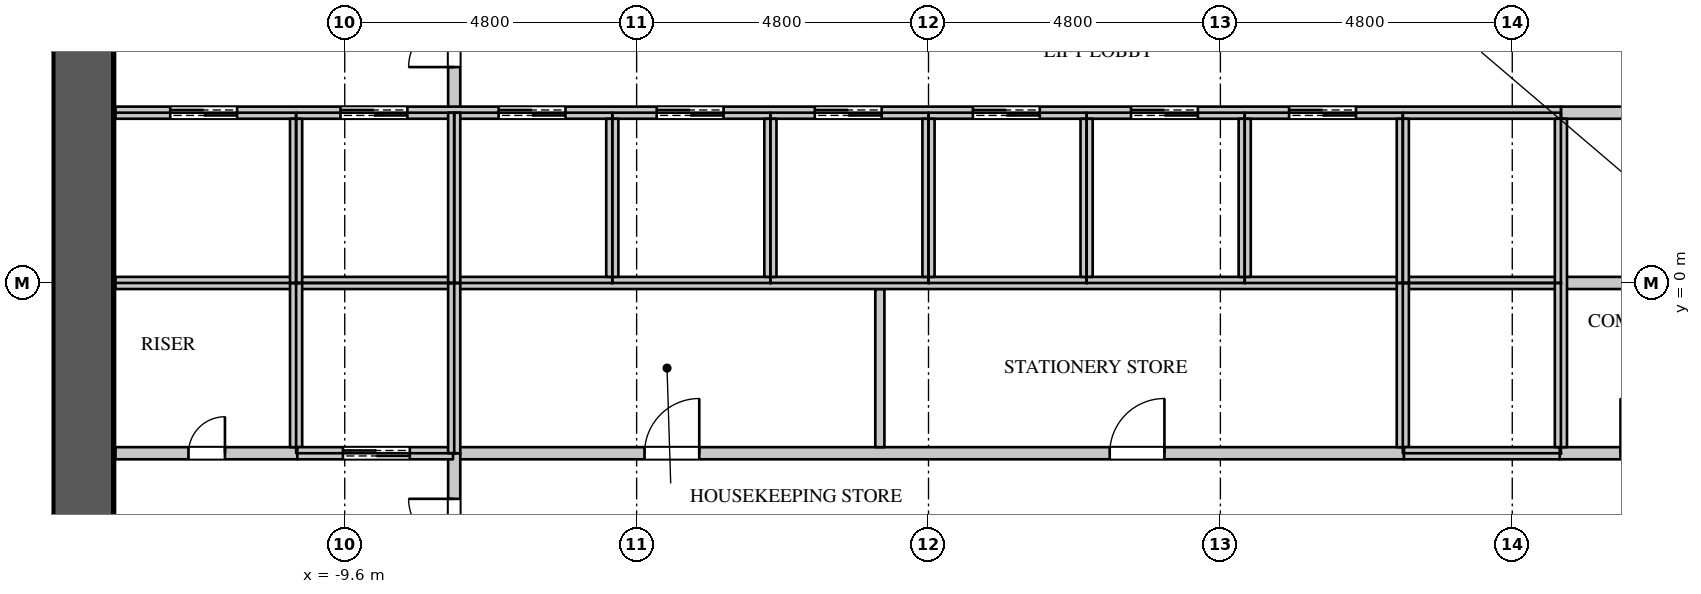
"""IFC4 building model, lengths in metres.
Left out: names, types, materials, properties, quantities, classifications, styles, units other than length and angle.
Written with IfcOpenShell. Run it as: python <this file> out.ifc"""

import sys

from ifc_helpers import new_model, si_unit, direction, frame, frame_2d, origin, place, context, subcontext, project, spatial, rectangle, extrude, element, fill, save


model = new_model("IFC4")
c1 = context("Model", 3, precision=1e-05, world=origin(), true_north=direction((0.0, 1.0)))
c2 = subcontext(c1, "Body", "Model", "MODEL_VIEW")
j1 = project(units=[si_unit("LENGTHUNIT", "METRE"), si_unit("PLANEANGLEUNIT", "RADIAN")], contexts=[c1])
p1 = place(None, origin())
s1 = spatial("IfcSite", under=j1, at=p1, CompositionType="ELEMENT")
p2 = place(p1, origin())
s2 = spatial("IfcBuilding", under=s1, at=p2, CompositionType="ELEMENT")
p3 = place(p2, frame((0.0, 0.0, 38.1)))
s3 = spatial("IfcBuildingStorey", under=s2, at=p3, CompositionType="ELEMENT", Elevation=38.1)
p4 = place(p3, frame((-13.9, -11.0, 0.0), z_axis=(0.0, 0.0, 1.0), x_axis=(0.0, 1.0, 0.0)))
e1 = element("IfcWall", 1, at=p4, inside=s3, PredefinedType="SHEAR", context=c2, shape_type="SweptSolid", body=[
    extrude(rectangle(XDim=22.0, YDim=1.0, at=frame_2d((11.0, 0.0))), origin(), (0.0, 0.0, 1.0), 4.2),
])
p5 = place(p4, frame((20.05, 0.0, 0.0)))
e2 = element("IfcOpeningElement", 2, at=p5, cuts=e1, PredefinedType="OPENING", context=c2, shape_type="SweptSolid", body=[
    extrude(rectangle(XDim=1.1, YDim=2.2, at=frame_2d((0.55, 1.1))), frame((0.0, 0.51, 0.0), z_axis=(0.0, -1.0, 0.0), x_axis=(1.0, 0.0, 0.0)), (0.0, 0.0, 1.0), 1.02),
])
p6 = place(p4, frame((0.85, 0.0, 0.0)))
e3 = element("IfcOpeningElement", 3, at=p6, cuts=e1, PredefinedType="OPENING", context=c2, shape_type="SweptSolid", body=[
    extrude(rectangle(XDim=1.1, YDim=2.2, at=frame_2d((0.55, 1.1))), frame((0.0, 0.51, 0.0), z_axis=(0.0, -1.0, 0.0), x_axis=(1.0, 0.0, 0.0)), (0.0, 0.0, 1.0), 1.02),
])
p7 = place(p4, frame((15.75, 0.0, 0.0)))
e4 = element("IfcOpeningElement", 4, at=p7, cuts=e1, PredefinedType="OPENING", context=c2, shape_type="SweptSolid", body=[
    extrude(rectangle(XDim=1.5, YDim=2.4, at=frame_2d((0.75, 1.2))), frame((0.0, 0.51, 0.0), z_axis=(0.0, -1.0, 0.0), x_axis=(1.0, 0.0, 0.0)), (0.0, 0.0, 1.0), 1.02),
])
p8 = place(p4, frame((4.75, 0.0, 0.0)))
e5 = element("IfcOpeningElement", 5, at=p8, cuts=e1, PredefinedType="OPENING", context=c2, shape_type="SweptSolid", body=[
    extrude(rectangle(XDim=1.5, YDim=2.4, at=frame_2d((0.75, 1.2))), frame((0.0, 0.51, 0.0), z_axis=(0.0, -1.0, 0.0), x_axis=(1.0, 0.0, 0.0)), (0.0, 0.0, 1.0), 1.02),
])
p9 = place(p3, frame((-7.82, -2.8, 0.0), z_axis=(0.0, 0.0, 1.0), x_axis=(1.0, 0.0, 0.0)))
e6 = element("IfcWall", 6, at=p9, inside=s3, PredefinedType="PARTITIONING", context=c2, shape_type="SweptSolid", body=[
    extrude(rectangle(XDim=15.64, YDim=0.2, at=frame_2d((7.82, 0.0))), origin(), (0.0, 0.0, 1.0), 3.95),
])
p10 = place(p9, frame((3.15, 0.0, 0.0)))
e7 = element("IfcOpeningElement", 7, at=p10, cuts=e6, PredefinedType="OPENING", context=c2, shape_type="SweptSolid", body=[
    extrude(rectangle(XDim=0.9, YDim=2.2, at=frame_2d((0.45, 1.1))), frame((0.0, 0.11, 0.0), z_axis=(0.0, -1.0, 0.0), x_axis=(1.0, 0.0, 0.0)), (0.0, 0.0, 1.0), 0.22),
])
p11 = place(p9, frame((10.8, 0.0, 0.0)))
e8 = element("IfcOpeningElement", 8, at=p11, cuts=e6, PredefinedType="OPENING", context=c2, shape_type="SweptSolid", body=[
    extrude(rectangle(XDim=0.9, YDim=2.2, at=frame_2d((0.45, 1.1))), frame((0.0, 0.11, 0.0), z_axis=(0.0, -1.0, 0.0), x_axis=(1.0, 0.0, 0.0)), (0.0, 0.0, 1.0), 0.22),
])
p12 = place(p3, frame((-7.8, -5.8, 0.0), z_axis=(0.0, 0.0, 1.0), x_axis=(0.0, 1.0, 0.0)))
e9 = element("IfcWall", 9, at=p12, inside=s3, PredefinedType="PARTITIONING", context=c2, shape_type="SweptSolid", body=[
    extrude(rectangle(XDim=3.0, YDim=0.2, at=frame_2d((1.5, 0.0))), origin(), (0.0, 0.0, 1.0), 3.95),
])
p13 = place(p12, frame((0.75, 0.0, 0.0)))
e10 = element("IfcOpeningElement", 10, at=p13, cuts=e9, PredefinedType="OPENING", context=c2, shape_type="SweptSolid", body=[
    extrude(rectangle(XDim=1.5, YDim=2.4, at=frame_2d((0.75, 1.2))), frame((0.0, 0.11, 0.0), z_axis=(0.0, -1.0, 0.0), x_axis=(1.0, 0.0, 0.0)), (0.0, 0.0, 1.0), 0.22),
])
p14 = place(p3, frame((-7.8, 2.8, 0.0), z_axis=(0.0, 0.0, 1.0), x_axis=(0.0, 1.0, 0.0)))
e11 = element("IfcWall", 11, at=p14, inside=s3, PredefinedType="PARTITIONING", context=c2, shape_type="SweptSolid", body=[
    extrude(rectangle(XDim=5.275, YDim=0.2, at=frame_2d((2.637, 0.0))), origin(), (0.0, 0.0, 1.0), 3.95),
])
p15 = place(p14, frame((0.75, 0.0, 0.0)))
e12 = element("IfcOpeningElement", 12, at=p15, cuts=e11, PredefinedType="OPENING", context=c2, shape_type="SweptSolid", body=[
    extrude(rectangle(XDim=1.5, YDim=2.4, at=frame_2d((0.75, 1.2))), frame((0.0, 0.11, 0.0), z_axis=(0.0, -1.0, 0.0), x_axis=(1.0, 0.0, 0.0)), (0.0, 0.0, 1.0), 0.22),
])
p16 = place(p3, frame((-0.8, -2.7, 0.0), z_axis=(0.0, 0.0, 1.0), x_axis=(0.0, 1.0, 0.0)))
e13 = element("IfcWall", 13, at=p16, inside=s3, PredefinedType="PARTITIONING", context=c2, shape_type="SweptSolid", body=[
    extrude(rectangle(XDim=2.6, YDim=0.15, at=frame_2d((1.3, 0.0))), origin(), (0.0, 0.0, 1.0), 3.95),
])
p17 = place(p3, frame((-13.37, -2.8, 0.0), z_axis=(0.0, 0.0, 1.0), x_axis=(1.0, 0.0, 0.0)))
e14 = element("IfcWall", 14, at=p17, inside=s3, PredefinedType="PARTITIONING", context=c2, shape_type="SweptSolid", body=[
    extrude(rectangle(XDim=2.99, YDim=0.2, at=frame_2d((1.495, 0.0))), origin(), (0.0, 0.0, 1.0), 3.95),
])
p18 = place(p17, frame((1.2, 0.0, 0.0)))
e15 = element("IfcOpeningElement", 15, at=p18, cuts=e14, PredefinedType="OPENING", context=c2, shape_type="SweptSolid", body=[
    extrude(rectangle(XDim=0.6, YDim=2.0, at=frame_2d((0.3, 1.0))), frame((0.0, 0.11, 0.0), z_axis=(0.0, -1.0, 0.0), x_axis=(1.0, 0.0, 0.0)), (0.0, 0.0, 1.0), 0.22),
])
p19 = place(p3, frame((10.38, -2.8, 0.0), z_axis=(0.0, 0.0, 1.0), x_axis=(1.0, 0.0, 0.0)))
e16 = element("IfcWall", 16, at=p19, inside=s3, PredefinedType="PARTITIONING", context=c2, shape_type="SweptSolid", body=[
    extrude(rectangle(XDim=2.99, YDim=0.2, at=frame_2d((1.495, 0.0))), origin(), (0.0, 0.0, 1.0), 3.95),
])
p20 = place(p19, frame((1.0, 0.0, 0.0)))
e17 = element("IfcOpeningElement", 17, at=p20, cuts=e16, PredefinedType="OPENING", context=c2, shape_type="SweptSolid", body=[
    extrude(rectangle(XDim=0.9, YDim=2.2, at=frame_2d((0.45, 1.1))), frame((0.0, 0.11, 0.0), z_axis=(0.0, -1.0, 0.0), x_axis=(1.0, 0.0, 0.0)), (0.0, 0.0, 1.0), 0.22),
])
p21 = place(p3, frame((10.4, 2.8, 0.0), z_axis=(0.0, 0.0, 1.0), x_axis=(1.0, 0.0, 0.0)))
e18 = element("IfcWall", 18, at=p21, inside=s3, PredefinedType="PARTITIONING", context=c2, shape_type="SweptSolid", body=[
    extrude(rectangle(XDim=2.97, YDim=0.2, at=frame_2d((1.485, 0.0))), origin(), (0.0, 0.0, 1.0), 3.95),
])
p22 = place(p21, frame((1.2, 0.0, 0.0)))
e19 = element("IfcOpeningElement", 19, at=p22, cuts=e18, PredefinedType="OPENING", context=c2, shape_type="SweptSolid", body=[
    extrude(rectangle(XDim=0.6, YDim=2.0, at=frame_2d((0.3, 1.0))), frame((0.0, 0.11, 0.0), z_axis=(0.0, -1.0, 0.0), x_axis=(1.0, 0.0, 0.0)), (0.0, 0.0, 1.0), 0.22),
])
p23 = place(p3, frame((10.4, 0.0, 0.0), z_axis=(0.0, 0.0, 1.0), x_axis=(1.0, 0.0, 0.0)))
e20 = element("IfcWall", 20, at=p23, inside=s3, PredefinedType="PARTITIONING", context=c2, shape_type="SweptSolid", body=[
    extrude(rectangle(XDim=2.97, YDim=0.2, at=frame_2d((1.485, 0.0))), origin(), (0.0, 0.0, 1.0), 3.95),
])
p24 = place(p3, frame((-13.37, 0.0, 0.0), z_axis=(0.0, 0.0, 1.0), x_axis=(1.0, 0.0, 0.0)))
e21 = element("IfcWall", 21, at=p24, inside=s3, PredefinedType="PARTITIONING", context=c2, shape_type="SweptSolid", body=[
    extrude(rectangle(XDim=23.77, YDim=0.2, at=frame_2d((11.885, 0.0))), origin(), (0.0, 0.0, 1.0), 3.95),
])
p25 = place(p3, frame((-13.37, 2.8, 0.0), z_axis=(0.0, 0.0, 1.0), x_axis=(1.0, 0.0, 0.0)))
e22 = element("IfcWall", 22, at=p25, inside=s3, PredefinedType="PARTITIONING", context=c2, shape_type="SweptSolid", body=[
    extrude(rectangle(XDim=23.77, YDim=0.2, at=frame_2d((11.885, 0.0))), origin(), (0.0, 0.0, 1.0), 3.95),
])
p26 = place(p25, frame((0.9, 0.0, 0.0)))
e23 = element("IfcOpeningElement", 23, at=p26, cuts=e22, PredefinedType="OPENING", context=c2, shape_type="SweptSolid", body=[
    extrude(rectangle(XDim=1.1, YDim=2.2, at=frame_2d((0.55, 1.1))), frame((0.0, 0.11, 0.0), z_axis=(0.0, -1.0, 0.0), x_axis=(1.0, 0.0, 0.0)), (0.0, 0.0, 1.0), 0.22),
])
p27 = place(p25, frame((3.7, 0.0, 0.0)))
e24 = element("IfcOpeningElement", 24, at=p27, cuts=e22, PredefinedType="OPENING", context=c2, shape_type="SweptSolid", body=[
    extrude(rectangle(XDim=1.1, YDim=2.2, at=frame_2d((0.55, 1.1))), frame((0.0, 0.11, 0.0), z_axis=(0.0, -1.0, 0.0), x_axis=(1.0, 0.0, 0.0)), (0.0, 0.0, 1.0), 0.22),
])
p28 = place(p25, frame((6.3, 0.0, 0.0)))
e25 = element("IfcOpeningElement", 25, at=p28, cuts=e22, PredefinedType="OPENING", context=c2, shape_type="SweptSolid", body=[
    extrude(rectangle(XDim=1.1, YDim=2.2, at=frame_2d((0.55, 1.1))), frame((0.0, 0.11, 0.0), z_axis=(0.0, -1.0, 0.0), x_axis=(1.0, 0.0, 0.0)), (0.0, 0.0, 1.0), 0.22),
])
p29 = place(p25, frame((8.9, 0.0, 0.0)))
e26 = element("IfcOpeningElement", 26, at=p29, cuts=e22, PredefinedType="OPENING", context=c2, shape_type="SweptSolid", body=[
    extrude(rectangle(XDim=1.1, YDim=2.2, at=frame_2d((0.55, 1.1))), frame((0.0, 0.11, 0.0), z_axis=(0.0, -1.0, 0.0), x_axis=(1.0, 0.0, 0.0)), (0.0, 0.0, 1.0), 0.22),
])
p30 = place(p25, frame((11.5, 0.0, 0.0)))
e27 = element("IfcOpeningElement", 27, at=p30, cuts=e22, PredefinedType="OPENING", context=c2, shape_type="SweptSolid", body=[
    extrude(rectangle(XDim=1.1, YDim=2.2, at=frame_2d((0.55, 1.1))), frame((0.0, 0.11, 0.0), z_axis=(0.0, -1.0, 0.0), x_axis=(1.0, 0.0, 0.0)), (0.0, 0.0, 1.0), 0.22),
])
p31 = place(p25, frame((14.1, 0.0, 0.0)))
e28 = element("IfcOpeningElement", 28, at=p31, cuts=e22, PredefinedType="OPENING", context=c2, shape_type="SweptSolid", body=[
    extrude(rectangle(XDim=1.1, YDim=2.2, at=frame_2d((0.55, 1.1))), frame((0.0, 0.11, 0.0), z_axis=(0.0, -1.0, 0.0), x_axis=(1.0, 0.0, 0.0)), (0.0, 0.0, 1.0), 0.22),
])
p32 = place(p25, frame((16.7, 0.0, 0.0)))
e29 = element("IfcOpeningElement", 29, at=p32, cuts=e22, PredefinedType="OPENING", context=c2, shape_type="SweptSolid", body=[
    extrude(rectangle(XDim=1.1, YDim=2.2, at=frame_2d((0.55, 1.1))), frame((0.0, 0.11, 0.0), z_axis=(0.0, -1.0, 0.0), x_axis=(1.0, 0.0, 0.0)), (0.0, 0.0, 1.0), 0.22),
])
p33 = place(p25, frame((19.3, 0.0, 0.0)))
e30 = element("IfcOpeningElement", 30, at=p33, cuts=e22, PredefinedType="OPENING", context=c2, shape_type="SweptSolid", body=[
    extrude(rectangle(XDim=1.1, YDim=2.2, at=frame_2d((0.55, 1.1))), frame((0.0, 0.11, 0.0), z_axis=(0.0, -1.0, 0.0), x_axis=(1.0, 0.0, 0.0)), (0.0, 0.0, 1.0), 0.22),
])
p34 = place(p3, frame((-10.4, -2.7, 0.0), z_axis=(0.0, 0.0, 1.0), x_axis=(0.0, 1.0, 0.0)))
e31 = element("IfcWall", 31, at=p34, inside=s3, PredefinedType="PARTITIONING", context=c2, shape_type="SweptSolid", body=[
    extrude(rectangle(XDim=2.7, YDim=0.2, at=frame_2d((1.35, 0.0))), origin(), (0.0, 0.0, 1.0), 3.95),
])
p35 = place(p3, frame((-10.38, -2.8, 0.0), z_axis=(0.0, 0.0, 1.0), x_axis=(1.0, 0.0, 0.0)))
e32 = element("IfcWall", 32, at=p35, inside=s3, PredefinedType="PARTITIONING", context=c2, shape_type="SweptSolid", body=[
    extrude(rectangle(XDim=2.56, YDim=0.2, at=frame_2d((1.28, 0.0))), origin(), (0.0, 0.0, 1.0), 3.95),
])
p36 = place(p35, frame((0.75, 0.0, 0.0)))
e33 = element("IfcOpeningElement", 33, at=p36, cuts=e32, PredefinedType="OPENING", context=c2, shape_type="SweptSolid", body=[
    extrude(rectangle(XDim=1.1, YDim=2.2, at=frame_2d((0.55, 1.1))), frame((0.0, 0.11, 0.0), z_axis=(0.0, -1.0, 0.0), x_axis=(1.0, 0.0, 0.0)), (0.0, 0.0, 1.0), 0.22),
])
p37 = place(p3, frame((-10.4, 0.0, 0.0), z_axis=(0.0, 0.0, 1.0), x_axis=(0.0, 1.0, 0.0)))
e34 = element("IfcWall", 34, at=p37, inside=s3, PredefinedType="PARTITIONING", context=c2, shape_type="SweptSolid", body=[
    extrude(rectangle(XDim=2.7, YDim=0.2, at=frame_2d((1.35, 0.0))), origin(), (0.0, 0.0, 1.0), 3.95),
])
for number, where, z_axis, x_axis in (
    (35, (-7.8, -2.8, 0.0), (0.0, 0.0, 1.0), (0.0, 1.0, 0.0)),
    (36, (-7.8, 0.0, 0.0), (0.0, 0.0, 1.0), (0.0, 1.0, 0.0)),
):
    element("IfcWall", number, at=place(p3, frame(where, z_axis=z_axis, x_axis=x_axis)), inside=s3, PredefinedType="PARTITIONING", context=c2, shape_type="SweptSolid", body=[
        extrude(rectangle(XDim=2.8, YDim=0.2, at=frame_2d((1.4, 0.0))), origin(), (0.0, 0.0, 1.0), 3.95),
    ])
for number, where, z_axis, x_axis in (
    (37, (-5.2, 0.1, 0.0), (0.0, 0.0, 1.0), (0.0, 1.0, 0.0)),
    (38, (-2.6, 0.1, 0.0), (0.0, 0.0, 1.0), (0.0, 1.0, 0.0)),
    (39, (0.0, 0.1, 0.0), (0.0, 0.0, 1.0), (0.0, 1.0, 0.0)),
    (40, (2.6, 0.1, 0.0), (0.0, 0.0, 1.0), (0.0, 1.0, 0.0)),
    (41, (5.2, 0.1, 0.0), (0.0, 0.0, 1.0), (0.0, 1.0, 0.0)),
):
    element("IfcWall", number, at=place(p3, frame(where, z_axis=z_axis, x_axis=x_axis)), inside=s3, PredefinedType="PARTITIONING", context=c2, shape_type="SweptSolid", body=[
        extrude(rectangle(XDim=2.6, YDim=0.2, at=frame_2d((1.3, 0.0))), origin(), (0.0, 0.0, 1.0), 3.95),
    ])
p38 = place(p3, frame((7.8, -2.7, 0.0), z_axis=(0.0, 0.0, 1.0), x_axis=(0.0, 1.0, 0.0)))
e42 = element("IfcWall", 42, at=p38, inside=s3, PredefinedType="PARTITIONING", context=c2, shape_type="SweptSolid", body=[
    extrude(rectangle(XDim=2.7, YDim=0.2, at=frame_2d((1.35, 0.0))), origin(), (0.0, 0.0, 1.0), 3.95),
])
p39 = place(p3, frame((7.82, -2.8, 0.0), z_axis=(0.0, 0.0, 1.0), x_axis=(1.0, 0.0, 0.0)))
e43 = element("IfcWall", 43, at=p39, inside=s3, PredefinedType="PARTITIONING", context=c2, shape_type="SweptSolid", body=[
    extrude(rectangle(XDim=2.56, YDim=0.2, at=frame_2d((1.28, 0.0))), origin(), (0.0, 0.0, 1.0), 3.95),
])
p40 = place(p3, frame((7.8, 0.0, 0.0), z_axis=(0.0, 0.0, 1.0), x_axis=(0.0, 1.0, 0.0)))
e44 = element("IfcWall", 44, at=p40, inside=s3, PredefinedType="PARTITIONING", context=c2, shape_type="SweptSolid", body=[
    extrude(rectangle(XDim=2.7, YDim=0.2, at=frame_2d((1.35, 0.0))), origin(), (0.0, 0.0, 1.0), 3.95),
])
p41 = place(p3, frame((10.4, -2.7, 0.0), z_axis=(0.0, 0.0, 1.0), x_axis=(0.0, 1.0, 0.0)))
e45 = element("IfcWall", 45, at=p41, inside=s3, PredefinedType="PARTITIONING", context=c2, shape_type="SweptSolid", body=[
    extrude(rectangle(XDim=5.4, YDim=0.2, at=frame_2d((2.7, 0.0))), origin(), (0.0, 0.0, 1.0), 3.95),
])
p42 = place(p18, origin())
e46 = element("IfcDoor", 46, at=p42, inside=s3, OperationType="SINGLE_SWING_RIGHT", PredefinedType="DOOR", context=c2, shape_type="SweptSolid", body=[
    extrude(rectangle(XDim=0.6, YDim=2.0, at=frame_2d((0.3, 1.0))), frame((0.0, 0.025, 0.0), z_axis=(0.0, -1.0, 0.0), x_axis=(1.0, 0.0, 0.0)), (0.0, 0.0, 1.0), 0.05),
])
fill(e15, e46)
p43 = place(p20, origin())
e47 = element("IfcDoor", 47, at=p43, inside=s3, OperationType="SINGLE_SWING_LEFT", PredefinedType="DOOR", context=c2, shape_type="SweptSolid", body=[
    extrude(rectangle(XDim=0.9, YDim=2.2, at=frame_2d((0.45, 1.1))), frame((0.0, 0.025, 0.0), z_axis=(0.0, -1.0, 0.0), x_axis=(1.0, 0.0, 0.0)), (0.0, 0.0, 1.0), 0.05),
])
fill(e17, e47)
p44 = place(p10, origin())
e48 = element("IfcDoor", 48, at=p44, inside=s3, OperationType="SINGLE_SWING_RIGHT", PredefinedType="DOOR", context=c2, shape_type="SweptSolid", body=[
    extrude(rectangle(XDim=0.9, YDim=2.2, at=frame_2d((0.45, 1.1))), frame((0.0, 0.025, 0.0), z_axis=(0.0, -1.0, 0.0), x_axis=(1.0, 0.0, 0.0)), (0.0, 0.0, 1.0), 0.05),
])
fill(e7, e48)
p45 = place(p11, origin())
e49 = element("IfcDoor", 49, at=p45, inside=s3, OperationType="SINGLE_SWING_RIGHT", PredefinedType="DOOR", context=c2, shape_type="SweptSolid", body=[
    extrude(rectangle(XDim=0.9, YDim=2.2, at=frame_2d((0.45, 1.1))), frame((0.0, 0.025, 0.0), z_axis=(0.0, -1.0, 0.0), x_axis=(1.0, 0.0, 0.0)), (0.0, 0.0, 1.0), 0.05),
])
fill(e8, e49)
p46 = place(p26, origin())
e50 = element("IfcDoor", 50, at=p46, inside=s3, OperationType="DOUBLE_DOOR_SLIDING", PredefinedType="DOOR", context=c2, shape_type="SweptSolid", body=[
    extrude(rectangle(XDim=1.1, YDim=2.2, at=frame_2d((0.55, 1.1))), frame((0.0, 0.025, 0.0), z_axis=(0.0, -1.0, 0.0), x_axis=(1.0, 0.0, 0.0)), (0.0, 0.0, 1.0), 0.05),
])
fill(e23, e50)
p47 = place(p27, origin())
e51 = element("IfcDoor", 51, at=p47, inside=s3, OperationType="DOUBLE_DOOR_SLIDING", PredefinedType="DOOR", context=c2, shape_type="SweptSolid", body=[
    extrude(rectangle(XDim=1.1, YDim=2.2, at=frame_2d((0.55, 1.1))), frame((0.0, 0.025, 0.0), z_axis=(0.0, -1.0, 0.0), x_axis=(1.0, 0.0, 0.0)), (0.0, 0.0, 1.0), 0.05),
])
fill(e24, e51)
p48 = place(p36, origin())
e52 = element("IfcDoor", 52, at=p48, inside=s3, OperationType="DOUBLE_DOOR_SLIDING", PredefinedType="DOOR", context=c2, shape_type="SweptSolid", body=[
    extrude(rectangle(XDim=1.1, YDim=2.2, at=frame_2d((0.55, 1.1))), frame((0.0, 0.025, 0.0), z_axis=(0.0, -1.0, 0.0), x_axis=(1.0, 0.0, 0.0)), (0.0, 0.0, 1.0), 0.05),
])
fill(e33, e52)
p49 = place(p28, origin())
e53 = element("IfcDoor", 53, at=p49, inside=s3, OperationType="DOUBLE_DOOR_SLIDING", PredefinedType="DOOR", context=c2, shape_type="SweptSolid", body=[
    extrude(rectangle(XDim=1.1, YDim=2.2, at=frame_2d((0.55, 1.1))), frame((0.0, 0.025, 0.0), z_axis=(0.0, -1.0, 0.0), x_axis=(1.0, 0.0, 0.0)), (0.0, 0.0, 1.0), 0.05),
])
fill(e25, e53)
p50 = place(p29, origin())
e54 = element("IfcDoor", 54, at=p50, inside=s3, OperationType="DOUBLE_DOOR_SLIDING", PredefinedType="DOOR", context=c2, shape_type="SweptSolid", body=[
    extrude(rectangle(XDim=1.1, YDim=2.2, at=frame_2d((0.55, 1.1))), frame((0.0, 0.025, 0.0), z_axis=(0.0, -1.0, 0.0), x_axis=(1.0, 0.0, 0.0)), (0.0, 0.0, 1.0), 0.05),
])
fill(e26, e54)
p51 = place(p30, origin())
e55 = element("IfcDoor", 55, at=p51, inside=s3, OperationType="DOUBLE_DOOR_SLIDING", PredefinedType="DOOR", context=c2, shape_type="SweptSolid", body=[
    extrude(rectangle(XDim=1.1, YDim=2.2, at=frame_2d((0.55, 1.1))), frame((0.0, 0.025, 0.0), z_axis=(0.0, -1.0, 0.0), x_axis=(1.0, 0.0, 0.0)), (0.0, 0.0, 1.0), 0.05),
])
fill(e27, e55)
p52 = place(p31, origin())
e56 = element("IfcDoor", 56, at=p52, inside=s3, OperationType="DOUBLE_DOOR_SLIDING", PredefinedType="DOOR", context=c2, shape_type="SweptSolid", body=[
    extrude(rectangle(XDim=1.1, YDim=2.2, at=frame_2d((0.55, 1.1))), frame((0.0, 0.025, 0.0), z_axis=(0.0, -1.0, 0.0), x_axis=(1.0, 0.0, 0.0)), (0.0, 0.0, 1.0), 0.05),
])
fill(e28, e56)
p53 = place(p32, origin())
e57 = element("IfcDoor", 57, at=p53, inside=s3, OperationType="DOUBLE_DOOR_SLIDING", PredefinedType="DOOR", context=c2, shape_type="SweptSolid", body=[
    extrude(rectangle(XDim=1.1, YDim=2.2, at=frame_2d((0.55, 1.1))), frame((0.0, 0.025, 0.0), z_axis=(0.0, -1.0, 0.0), x_axis=(1.0, 0.0, 0.0)), (0.0, 0.0, 1.0), 0.05),
])
fill(e29, e57)
p54 = place(p33, origin())
e58 = element("IfcDoor", 58, at=p54, inside=s3, OperationType="DOUBLE_DOOR_SLIDING", PredefinedType="DOOR", context=c2, shape_type="SweptSolid", body=[
    extrude(rectangle(XDim=1.1, YDim=2.2, at=frame_2d((0.55, 1.1))), frame((0.0, 0.025, 0.0), z_axis=(0.0, -1.0, 0.0), x_axis=(1.0, 0.0, 0.0)), (0.0, 0.0, 1.0), 0.05),
])
fill(e30, e58)
p55 = place(p15, origin())
e59 = element("IfcDoor", 59, at=p55, inside=s3, OperationType="DOUBLE_DOOR_SINGLE_SWING", PredefinedType="DOOR", context=c2, shape_type="SweptSolid", body=[
    extrude(rectangle(XDim=1.5, YDim=2.4, at=frame_2d((0.75, 1.2))), frame((0.0, 0.025, 0.0), z_axis=(0.0, -1.0, 0.0), x_axis=(1.0, 0.0, 0.0)), (0.0, 0.0, 1.0), 0.05),
])
fill(e12, e59)
p56 = place(p13, origin())
e60 = element("IfcDoor", 60, at=p56, inside=s3, OperationType="DOUBLE_DOOR_SINGLE_SWING", PredefinedType="DOOR", context=c2, shape_type="SweptSolid", body=[
    extrude(rectangle(XDim=1.5, YDim=2.4, at=frame_2d((0.75, 1.2))), frame((0.0, 0.025, 0.0), z_axis=(0.0, -1.0, 0.0), x_axis=(1.0, 0.0, 0.0)), (0.0, 0.0, 1.0), 0.05),
])
fill(e10, e60)
save(model, sys.argv[1])
